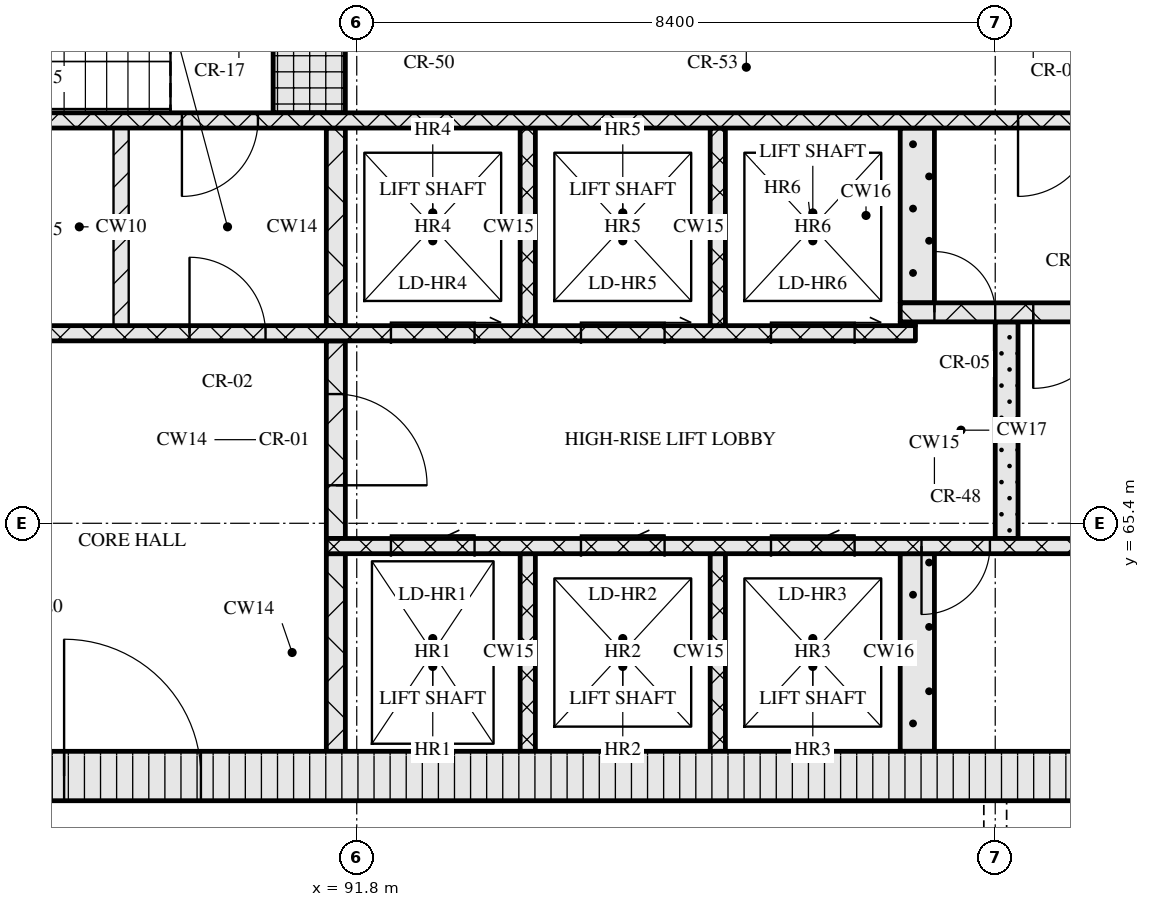
"""IFC4 building model, lengths in metres.
Left out: names, types, materials, properties, quantities, classifications, styles, units other than length and angle.
Written with IfcOpenShell. Run it as: python <this file> out.ifc"""

import sys

from ifc_helpers import new_model, si_unit, direction, frame, frame_2d, origin, place, context, subcontext, project, spatial, rectangle, extrude, element, fill, save


model = new_model("IFC4")
c1 = context("Model", 3, precision=1e-05, world=origin(), true_north=direction((0.0, 1.0)))
c2 = subcontext(c1, "Body", "Model", "MODEL_VIEW")
j1 = project(units=[si_unit("LENGTHUNIT", "METRE"), si_unit("PLANEANGLEUNIT", "RADIAN")], contexts=[c1])
p1 = place(None, origin())
s1 = spatial("IfcSite", under=j1, at=p1, CompositionType="ELEMENT")
p2 = place(p1, origin())
s2 = spatial("IfcBuilding", under=s1, at=p2, CompositionType="ELEMENT")
p3 = place(p2, frame((0.0, 0.0, 223.5)))
s3 = spatial("IfcBuildingStorey", under=s2, at=p3, CompositionType="ELEMENT", Elevation=223.5)
p4 = place(p3, frame((67.15, 62.075, 0.0), z_axis=(0.0, 0.0, 1.0), x_axis=(1.0, 0.0, 0.0)))
e1 = element("IfcWall", 1, at=p4, inside=s3, PredefinedType="SOLIDWALL", context=c2, shape_type="SweptSolid", body=[
    extrude(rectangle(XDim=40.9, YDim=0.65, at=frame_2d((20.45, 0.0))), origin(), (0.0, 0.0, 1.0), 3.32),
])
p5 = place(p4, frame((20.8, 0.0, 0.0)))
e2 = element("IfcOpeningElement", 2, at=p5, cuts=e1, PredefinedType="OPENING", context=c2, shape_type="SweptSolid", body=[
    extrude(rectangle(XDim=1.8, YDim=2.1, at=frame_2d((0.9, 1.05))), frame((0.0, 0.335, 0.0), z_axis=(0.0, -1.0, 0.0), x_axis=(1.0, 0.0, 0.0)), (0.0, 0.0, 1.0), 0.67),
])
p6 = place(p3, frame((91.525, 62.4, 0.0), z_axis=(0.0, 0.0, 1.0), x_axis=(0.0, 1.0, 0.0)))
e3 = element("IfcWall", 3, at=p6, inside=s3, PredefinedType="SOLIDWALL", context=c2, shape_type="SweptSolid", body=[
    extrude(rectangle(XDim=2.6, YDim=0.25, at=frame_2d((1.3, 0.0))), origin(), (0.0, 0.0, 1.0), 3.32),
])
for number, where, z_axis, x_axis in (
    (4, (94.05, 62.4, 0.0), (0.0, 0.0, 1.0), (0.0, 1.0, 0.0)),
    (5, (96.55, 62.4, 0.0), (0.0, 0.0, 1.0), (0.0, 1.0, 0.0)),
):
    element("IfcWall", number, at=place(p3, frame(where, z_axis=z_axis, x_axis=x_axis)), inside=s3, PredefinedType="SOLIDWALL", context=c2, shape_type="SweptSolid", body=[
        extrude(rectangle(XDim=2.6, YDim=0.2, at=frame_2d((1.3, 0.0))), origin(), (0.0, 0.0, 1.0), 3.32),
    ])
p7 = place(p3, frame((99.175, 62.4, 0.0), z_axis=(0.0, 0.0, 1.0), x_axis=(0.0, 1.0, 0.0)))
e6 = element("IfcWall", 6, at=p7, inside=s3, PredefinedType="SOLIDWALL", context=c2, shape_type="SweptSolid", body=[
    extrude(rectangle(XDim=2.6, YDim=0.45, at=frame_2d((1.3, 0.0))), origin(), (0.0, 0.0, 1.0), 3.32),
])
p8 = place(p3, frame((91.4, 65.1, 0.0), z_axis=(0.0, 0.0, 1.0), x_axis=(1.0, 0.0, 0.0)))
e7 = element("IfcWall", 7, at=p8, inside=s3, PredefinedType="SOLIDWALL", context=c2, shape_type="SweptSolid", body=[
    extrude(rectangle(XDim=16.0, YDim=0.2, at=frame_2d((8.0, 0.0))), origin(), (0.0, 0.0, 1.0), 3.32),
])
p9 = place(p8, frame((0.85, 0.0, 0.0)))
e8 = element("IfcOpeningElement", 8, at=p9, cuts=e7, PredefinedType="OPENING", context=c2, shape_type="SweptSolid", body=[
    extrude(rectangle(XDim=1.1, YDim=2.1, at=frame_2d((0.55, 1.05))), frame((0.0, 0.11, 0.0), z_axis=(0.0, -1.0, 0.0), x_axis=(1.0, 0.0, 0.0)), (0.0, 0.0, 1.0), 0.22),
])
p10 = place(p8, frame((3.35, 0.0, 0.0)))
e9 = element("IfcOpeningElement", 9, at=p10, cuts=e7, PredefinedType="OPENING", context=c2, shape_type="SweptSolid", body=[
    extrude(rectangle(XDim=1.1, YDim=2.1, at=frame_2d((0.55, 1.05))), frame((0.0, 0.11, 0.0), z_axis=(0.0, -1.0, 0.0), x_axis=(1.0, 0.0, 0.0)), (0.0, 0.0, 1.0), 0.22),
])
p11 = place(p8, frame((5.85, 0.0, 0.0)))
e10 = element("IfcOpeningElement", 10, at=p11, cuts=e7, PredefinedType="OPENING", context=c2, shape_type="SweptSolid", body=[
    extrude(rectangle(XDim=1.1, YDim=2.1, at=frame_2d((0.55, 1.05))), frame((0.0, 0.11, 0.0), z_axis=(0.0, -1.0, 0.0), x_axis=(1.0, 0.0, 0.0)), (0.0, 0.0, 1.0), 0.22),
])
p12 = place(p8, frame((7.83, 0.0, 0.0)))
e11 = element("IfcOpeningElement", 11, at=p12, cuts=e7, PredefinedType="OPENING", context=c2, shape_type="SweptSolid", body=[
    extrude(rectangle(XDim=0.9, YDim=2.1, at=frame_2d((0.45, 1.05))), frame((0.0, 0.11, 0.0), z_axis=(0.0, -1.0, 0.0), x_axis=(1.0, 0.0, 0.0)), (0.0, 0.0, 1.0), 0.22),
])
p13 = place(p3, frame((91.525, 65.2, 0.0), z_axis=(0.0, 0.0, 1.0), x_axis=(0.0, 1.0, 0.0)))
e12 = element("IfcWall", 12, at=p13, inside=s3, PredefinedType="SOLIDWALL", context=c2, shape_type="SweptSolid", body=[
    extrude(rectangle(XDim=2.6, YDim=0.25, at=frame_2d((1.3, 0.0))), origin(), (0.0, 0.0, 1.0), 3.32),
])
p14 = place(p13, frame((0.7, 0.0, 0.0)))
e13 = element("IfcOpeningElement", 13, at=p14, cuts=e12, PredefinedType="OPENING", context=c2, shape_type="SweptSolid", body=[
    extrude(rectangle(XDim=1.2, YDim=2.1, at=frame_2d((0.6, 1.05))), frame((0.0, 0.135, 0.0), z_axis=(0.0, -1.0, 0.0), x_axis=(1.0, 0.0, 0.0)), (0.0, 0.0, 1.0), 0.27),
])
p15 = place(p3, frame((100.35, 65.2, 0.0), z_axis=(0.0, 0.0, 1.0), x_axis=(0.0, 1.0, 0.0)))
e14 = element("IfcWall", 14, at=p15, inside=s3, PredefinedType="SOLIDWALL", context=c2, shape_type="SweptSolid", body=[
    extrude(rectangle(XDim=2.85, YDim=0.3, at=frame_2d((1.425, 0.0))), origin(), (0.0, 0.0, 1.0), 3.32),
])
p16 = place(p3, frame((76.05, 67.9, 0.0), z_axis=(0.0, 0.0, 1.0), x_axis=(1.0, 0.0, 0.0)))
e15 = element("IfcWall", 15, at=p16, inside=s3, PredefinedType="SOLIDWALL", context=c2, shape_type="SweptSolid", body=[
    extrude(rectangle(XDim=23.1, YDim=0.2, at=frame_2d((11.55, 0.0))), origin(), (0.0, 0.0, 1.0), 3.32),
])
p17 = place(p16, frame((3.2, 0.0, 0.0)))
e16 = element("IfcOpeningElement", 16, at=p17, cuts=e15, PredefinedType="OPENING", context=c2, shape_type="SweptSolid", body=[
    extrude(rectangle(XDim=0.9, YDim=2.1, at=frame_2d((0.45, 1.05))), frame((0.0, 0.11, 0.0), z_axis=(0.0, -1.0, 0.0), x_axis=(1.0, 0.0, 0.0)), (0.0, 0.0, 1.0), 0.22),
])
p18 = place(p16, frame((9.7, 0.0, 0.0)))
e17 = element("IfcOpeningElement", 17, at=p18, cuts=e15, PredefinedType="OPENING", context=c2, shape_type="SweptSolid", body=[
    extrude(rectangle(XDim=0.9, YDim=2.1, at=frame_2d((0.45, 1.05))), frame((0.0, 0.11, 0.0), z_axis=(0.0, -1.0, 0.0), x_axis=(1.0, 0.0, 0.0)), (0.0, 0.0, 1.0), 0.22),
])
p19 = place(p16, frame((13.55, 0.0, 0.0)))
e18 = element("IfcOpeningElement", 18, at=p19, cuts=e15, PredefinedType="OPENING", context=c2, shape_type="SweptSolid", body=[
    extrude(rectangle(XDim=1.0, YDim=2.1, at=frame_2d((0.5, 1.05))), frame((0.0, 0.11, 0.0), z_axis=(0.0, -1.0, 0.0), x_axis=(1.0, 0.0, 0.0)), (0.0, 0.0, 1.0), 0.22),
])
p20 = place(p16, frame((16.2, 0.0, 0.0)))
e19 = element("IfcOpeningElement", 19, at=p20, cuts=e15, PredefinedType="OPENING", context=c2, shape_type="SweptSolid", body=[
    extrude(rectangle(XDim=1.1, YDim=2.1, at=frame_2d((0.55, 1.05))), frame((0.0, 0.11, 0.0), z_axis=(0.0, -1.0, 0.0), x_axis=(1.0, 0.0, 0.0)), (0.0, 0.0, 1.0), 0.22),
])
p21 = place(p16, frame((18.7, 0.0, 0.0)))
e20 = element("IfcOpeningElement", 20, at=p21, cuts=e15, PredefinedType="OPENING", context=c2, shape_type="SweptSolid", body=[
    extrude(rectangle(XDim=1.1, YDim=2.1, at=frame_2d((0.55, 1.05))), frame((0.0, 0.11, 0.0), z_axis=(0.0, -1.0, 0.0), x_axis=(1.0, 0.0, 0.0)), (0.0, 0.0, 1.0), 0.22),
])
p22 = place(p16, frame((21.2, 0.0, 0.0)))
e21 = element("IfcOpeningElement", 21, at=p22, cuts=e15, PredefinedType="OPENING", context=c2, shape_type="SweptSolid", body=[
    extrude(rectangle(XDim=1.1, YDim=2.1, at=frame_2d((0.55, 1.05))), frame((0.0, 0.11, 0.0), z_axis=(0.0, -1.0, 0.0), x_axis=(1.0, 0.0, 0.0)), (0.0, 0.0, 1.0), 0.22),
])
p23 = place(p3, frame((88.7, 68.0, 0.0), z_axis=(0.0, 0.0, 1.0), x_axis=(0.0, 1.0, 0.0)))
e22 = element("IfcWall", 22, at=p23, inside=s3, PredefinedType="PARTITIONING", context=c2, shape_type="SweptSolid", body=[
    extrude(rectangle(XDim=2.6, YDim=0.2, at=frame_2d((1.3, 0.0))), origin(), (0.0, 0.0, 1.0), 3.32),
])
p24 = place(p3, frame((91.525, 68.0, 0.0), z_axis=(0.0, 0.0, 1.0), x_axis=(0.0, 1.0, 0.0)))
e23 = element("IfcWall", 23, at=p24, inside=s3, PredefinedType="SOLIDWALL", context=c2, shape_type="SweptSolid", body=[
    extrude(rectangle(XDim=2.6, YDim=0.25, at=frame_2d((1.3, 0.0))), origin(), (0.0, 0.0, 1.0), 3.32),
])
for number, where, z_axis, x_axis in (
    (24, (94.05, 68.0, 0.0), (0.0, 0.0, 1.0), (0.0, 1.0, 0.0)),
    (25, (96.55, 68.0, 0.0), (0.0, 0.0, 1.0), (0.0, 1.0, 0.0)),
):
    element("IfcWall", number, at=place(p3, frame(where, z_axis=z_axis, x_axis=x_axis)), inside=s3, PredefinedType="SOLIDWALL", context=c2, shape_type="SweptSolid", body=[
        extrude(rectangle(XDim=2.6, YDim=0.2, at=frame_2d((1.3, 0.0))), origin(), (0.0, 0.0, 1.0), 3.32),
    ])
p25 = place(p3, frame((98.95, 68.025, 0.0), z_axis=(0.0, 0.0, 1.0), x_axis=(1.0, 0.0, 0.0)))
e26 = element("IfcWall", 26, at=p25, inside=s3, PredefinedType="SOLIDWALL", context=c2, shape_type="SweptSolid", body=[
    extrude(rectangle(XDim=0.2, YDim=0.05, at=frame_2d((0.1, 0.0))), origin(), (0.0, 0.0, 1.0), 3.32),
])
p26 = place(p3, frame((98.95, 68.175, 0.0), z_axis=(0.0, 0.0, 1.0), x_axis=(1.0, 0.0, 0.0)))
e27 = element("IfcWall", 27, at=p26, inside=s3, PredefinedType="SOLIDWALL", context=c2, shape_type="SweptSolid", body=[
    extrude(rectangle(XDim=8.45, YDim=0.25, at=frame_2d((4.225, 0.0))), origin(), (0.0, 0.0, 1.0), 3.32),
])
p27 = place(p26, frame((0.45, 0.0, 0.0)))
e28 = element("IfcOpeningElement", 28, at=p27, cuts=e27, PredefinedType="OPENING", context=c2, shape_type="SweptSolid", body=[
    extrude(rectangle(XDim=0.8, YDim=2.1, at=frame_2d((0.4, 1.05))), frame((0.0, 0.135, 0.0), z_axis=(0.0, -1.0, 0.0), x_axis=(1.0, 0.0, 0.0)), (0.0, 0.0, 1.0), 0.27),
])
p28 = place(p26, frame((1.75, 0.0, 0.0)))
e29 = element("IfcOpeningElement", 29, at=p28, cuts=e27, PredefinedType="OPENING", context=c2, shape_type="SweptSolid", body=[
    extrude(rectangle(XDim=1.0, YDim=2.1, at=frame_2d((0.5, 1.05))), frame((0.0, 0.135, 0.0), z_axis=(0.0, -1.0, 0.0), x_axis=(1.0, 0.0, 0.0)), (0.0, 0.0, 1.0), 0.27),
])
p29 = place(p3, frame((99.175, 68.3, 0.0), z_axis=(0.0, 0.0, 1.0), x_axis=(0.0, 1.0, 0.0)))
e30 = element("IfcWall", 30, at=p29, inside=s3, PredefinedType="SOLIDWALL", context=c2, shape_type="SweptSolid", body=[
    extrude(rectangle(XDim=2.3, YDim=0.45, at=frame_2d((1.15, 0.0))), origin(), (0.0, 0.0, 1.0), 3.32),
])
p30 = place(p3, frame((67.8, 70.7, 0.0), z_axis=(0.0, 0.0, 1.0), x_axis=(1.0, 0.0, 0.0)))
e31 = element("IfcWall", 31, at=p30, inside=s3, PredefinedType="SOLIDWALL", context=c2, shape_type="SweptSolid", body=[
    extrude(rectangle(XDim=39.6, YDim=0.2, at=frame_2d((19.8, 0.0))), origin(), (0.0, 0.0, 1.0), 3.32),
])
p31 = place(p30, frame((0.65, 0.0, 0.0)))
e32 = element("IfcOpeningElement", 32, at=p31, cuts=e31, PredefinedType="OPENING", context=c2, shape_type="SweptSolid", body=[
    extrude(rectangle(XDim=1.1, YDim=2.1, at=frame_2d((0.55, 1.05))), frame((0.0, 0.11, 0.0), z_axis=(0.0, -1.0, 0.0), x_axis=(1.0, 0.0, 0.0)), (0.0, 0.0, 1.0), 0.22),
])
p32 = place(p30, frame((3.25, 0.0, 0.0)))
e33 = element("IfcOpeningElement", 33, at=p32, cuts=e31, PredefinedType="OPENING", context=c2, shape_type="SweptSolid", body=[
    extrude(rectangle(XDim=1.1, YDim=2.1, at=frame_2d((0.55, 1.05))), frame((0.0, 0.11, 0.0), z_axis=(0.0, -1.0, 0.0), x_axis=(1.0, 0.0, 0.0)), (0.0, 0.0, 1.0), 0.22),
])
p33 = place(p30, frame((5.9, 0.0, 0.0)))
e34 = element("IfcOpeningElement", 34, at=p33, cuts=e31, PredefinedType="OPENING", context=c2, shape_type="SweptSolid", body=[
    extrude(rectangle(XDim=1.0, YDim=2.1, at=frame_2d((0.5, 1.05))), frame((0.0, 0.11, 0.0), z_axis=(0.0, -1.0, 0.0), x_axis=(1.0, 0.0, 0.0)), (0.0, 0.0, 1.0), 0.22),
])
p34 = place(p30, frame((21.7, 0.0, 0.0)))
e35 = element("IfcOpeningElement", 35, at=p34, cuts=e31, PredefinedType="OPENING", context=c2, shape_type="SweptSolid", body=[
    extrude(rectangle(XDim=1.0, YDim=2.1, at=frame_2d((0.5, 1.05))), frame((0.0, 0.11, 0.0), z_axis=(0.0, -1.0, 0.0), x_axis=(1.0, 0.0, 0.0)), (0.0, 0.0, 1.0), 0.22),
])
p35 = place(p30, frame((32.7, 0.0, 0.0)))
e36 = element("IfcOpeningElement", 36, at=p35, cuts=e31, PredefinedType="OPENING", context=c2, shape_type="SweptSolid", body=[
    extrude(rectangle(XDim=1.0, YDim=2.1, at=frame_2d((0.5, 1.05))), frame((0.0, 0.11, 0.0), z_axis=(0.0, -1.0, 0.0), x_axis=(1.0, 0.0, 0.0)), (0.0, 0.0, 1.0), 0.22),
])
p36 = place(p30, frame((35.25, 0.0, 0.0)))
e37 = element("IfcOpeningElement", 37, at=p36, cuts=e31, PredefinedType="OPENING", context=c2, shape_type="SweptSolid", body=[
    extrude(rectangle(XDim=1.1, YDim=2.1, at=frame_2d((0.55, 1.05))), frame((0.0, 0.11, 0.0), z_axis=(0.0, -1.0, 0.0), x_axis=(1.0, 0.0, 0.0)), (0.0, 0.0, 1.0), 0.22),
])
p37 = place(p30, frame((37.85, 0.0, 0.0)))
e38 = element("IfcOpeningElement", 38, at=p37, cuts=e31, PredefinedType="OPENING", context=c2, shape_type="SweptSolid", body=[
    extrude(rectangle(XDim=1.1, YDim=2.1, at=frame_2d((0.55, 1.05))), frame((0.0, 0.11, 0.0), z_axis=(0.0, -1.0, 0.0), x_axis=(1.0, 0.0, 0.0)), (0.0, 0.0, 1.0), 0.22),
])
p38 = place(p3, frame((91.175, 70.8, 0.0), z_axis=(0.0, 0.0, 1.0), x_axis=(0.0, 1.0, 0.0)))
e39 = element("IfcWall", 39, at=p38, inside=s3, PredefinedType="SOLIDWALL", context=c2, shape_type="SweptSolid", body=[
    extrude(rectangle(XDim=1.2, YDim=0.95, at=frame_2d((0.6, 0.0))), origin(), (0.0, 0.0, 1.0), 3.32),
])
p39 = place(p5, origin())
e40 = element("IfcDoor", 40, at=p39, inside=s3, OperationType="DOUBLE_DOOR_SINGLE_SWING", PredefinedType="DOOR", context=c2, shape_type="SweptSolid", body=[
    extrude(rectangle(XDim=1.8, YDim=2.1, at=frame_2d((0.9, 1.05))), frame((0.0, 0.025, 0.0), z_axis=(0.0, -1.0, 0.0), x_axis=(1.0, 0.0, 0.0)), (0.0, 0.0, 1.0), 0.05),
])
fill(e2, e40)
p40 = place(p9, origin())
e41 = element("IfcDoor", 41, at=p40, inside=s3, OperationType="SLIDING_TO_LEFT", PredefinedType="DOOR", context=c2, shape_type="SweptSolid", body=[
    extrude(rectangle(XDim=1.1, YDim=2.1, at=frame_2d((0.55, 1.05))), frame((0.0, 0.025, 0.0), z_axis=(0.0, -1.0, 0.0), x_axis=(1.0, 0.0, 0.0)), (0.0, 0.0, 1.0), 0.05),
])
fill(e8, e41)
p41 = place(p10, origin())
e42 = element("IfcDoor", 42, at=p41, inside=s3, OperationType="SLIDING_TO_LEFT", PredefinedType="DOOR", context=c2, shape_type="SweptSolid", body=[
    extrude(rectangle(XDim=1.1, YDim=2.1, at=frame_2d((0.55, 1.05))), frame((0.0, 0.025, 0.0), z_axis=(0.0, -1.0, 0.0), x_axis=(1.0, 0.0, 0.0)), (0.0, 0.0, 1.0), 0.05),
])
fill(e9, e42)
p42 = place(p11, origin())
e43 = element("IfcDoor", 43, at=p42, inside=s3, OperationType="SLIDING_TO_LEFT", PredefinedType="DOOR", context=c2, shape_type="SweptSolid", body=[
    extrude(rectangle(XDim=1.1, YDim=2.1, at=frame_2d((0.55, 1.05))), frame((0.0, 0.025, 0.0), z_axis=(0.0, -1.0, 0.0), x_axis=(1.0, 0.0, 0.0)), (0.0, 0.0, 1.0), 0.05),
])
fill(e10, e43)
p43 = place(p12, origin())
e44 = element("IfcDoor", 44, at=p43, inside=s3, OperationType="SINGLE_SWING_RIGHT", PredefinedType="DOOR", context=c2, shape_type="SweptSolid", body=[
    extrude(rectangle(XDim=0.9, YDim=2.1, at=frame_2d((0.45, 1.05))), frame((0.0, 0.025, 0.0), z_axis=(0.0, -1.0, 0.0), x_axis=(1.0, 0.0, 0.0)), (0.0, 0.0, 1.0), 0.05),
])
fill(e11, e44)
p44 = place(p14, origin())
e45 = element("IfcDoor", 45, at=p44, inside=s3, OperationType="SINGLE_SWING_RIGHT", PredefinedType="DOOR", context=c2, shape_type="SweptSolid", body=[
    extrude(rectangle(XDim=1.2, YDim=2.1, at=frame_2d((0.6, 1.05))), frame((0.0, 0.025, 0.0), z_axis=(0.0, -1.0, 0.0), x_axis=(1.0, 0.0, 0.0)), (0.0, 0.0, 1.0), 0.05),
])
fill(e13, e45)
p45 = place(p19, origin())
e46 = element("IfcDoor", 46, at=p45, inside=s3, OperationType="SINGLE_SWING_LEFT", PredefinedType="DOOR", context=c2, shape_type="SweptSolid", body=[
    extrude(rectangle(XDim=1.0, YDim=2.1, at=frame_2d((0.5, 1.05))), frame((0.0, 0.025, 0.0), z_axis=(0.0, -1.0, 0.0), x_axis=(1.0, 0.0, 0.0)), (0.0, 0.0, 1.0), 0.05),
])
fill(e18, e46)
p46 = place(p20, origin())
e47 = element("IfcDoor", 47, at=p46, inside=s3, OperationType="SLIDING_TO_RIGHT", PredefinedType="DOOR", context=c2, shape_type="SweptSolid", body=[
    extrude(rectangle(XDim=1.1, YDim=2.1, at=frame_2d((0.55, 1.05))), frame((0.0, 0.025, 0.0), z_axis=(0.0, -1.0, 0.0), x_axis=(1.0, 0.0, 0.0)), (0.0, 0.0, 1.0), 0.05),
])
fill(e19, e47)
p47 = place(p21, origin())
e48 = element("IfcDoor", 48, at=p47, inside=s3, OperationType="SLIDING_TO_RIGHT", PredefinedType="DOOR", context=c2, shape_type="SweptSolid", body=[
    extrude(rectangle(XDim=1.1, YDim=2.1, at=frame_2d((0.55, 1.05))), frame((0.0, 0.025, 0.0), z_axis=(0.0, -1.0, 0.0), x_axis=(1.0, 0.0, 0.0)), (0.0, 0.0, 1.0), 0.05),
])
fill(e20, e48)
p48 = place(p22, origin())
e49 = element("IfcDoor", 49, at=p48, inside=s3, OperationType="SLIDING_TO_RIGHT", PredefinedType="DOOR", context=c2, shape_type="SweptSolid", body=[
    extrude(rectangle(XDim=1.1, YDim=2.1, at=frame_2d((0.55, 1.05))), frame((0.0, 0.025, 0.0), z_axis=(0.0, -1.0, 0.0), x_axis=(1.0, 0.0, 0.0)), (0.0, 0.0, 1.0), 0.05),
])
fill(e21, e49)
p49 = place(p27, origin())
e50 = element("IfcDoor", 50, at=p49, inside=s3, OperationType="SINGLE_SWING_LEFT", PredefinedType="DOOR", context=c2, shape_type="SweptSolid", body=[
    extrude(rectangle(XDim=0.8, YDim=2.1, at=frame_2d((0.4, 1.05))), frame((0.0, 0.025, 0.0), z_axis=(0.0, -1.0, 0.0), x_axis=(1.0, 0.0, 0.0)), (0.0, 0.0, 1.0), 0.05),
])
fill(e28, e50)
p50 = place(p28, origin())
e51 = element("IfcDoor", 51, at=p50, inside=s3, OperationType="SINGLE_SWING_RIGHT", PredefinedType="DOOR", context=c2, shape_type="SweptSolid", body=[
    extrude(rectangle(XDim=1.0, YDim=2.1, at=frame_2d((0.5, 1.05))), frame((0.0, 0.025, 0.0), z_axis=(0.0, -1.0, 0.0), x_axis=(1.0, 0.0, 0.0)), (0.0, 0.0, 1.0), 0.05),
])
fill(e29, e51)
p51 = place(p34, origin())
e52 = element("IfcDoor", 52, at=p51, inside=s3, OperationType="SINGLE_SWING_RIGHT", PredefinedType="DOOR", context=c2, shape_type="SweptSolid", body=[
    extrude(rectangle(XDim=1.0, YDim=2.1, at=frame_2d((0.5, 1.05))), frame((0.0, 0.025, 0.0), z_axis=(0.0, -1.0, 0.0), x_axis=(1.0, 0.0, 0.0)), (0.0, 0.0, 1.0), 0.05),
])
fill(e35, e52)
p52 = place(p35, origin())
e53 = element("IfcDoor", 53, at=p52, inside=s3, OperationType="SINGLE_SWING_RIGHT", PredefinedType="DOOR", context=c2, shape_type="SweptSolid", body=[
    extrude(rectangle(XDim=1.0, YDim=2.1, at=frame_2d((0.5, 1.05))), frame((0.0, 0.025, 0.0), z_axis=(0.0, -1.0, 0.0), x_axis=(1.0, 0.0, 0.0)), (0.0, 0.0, 1.0), 0.05),
])
fill(e36, e53)
save(model, sys.argv[1])
